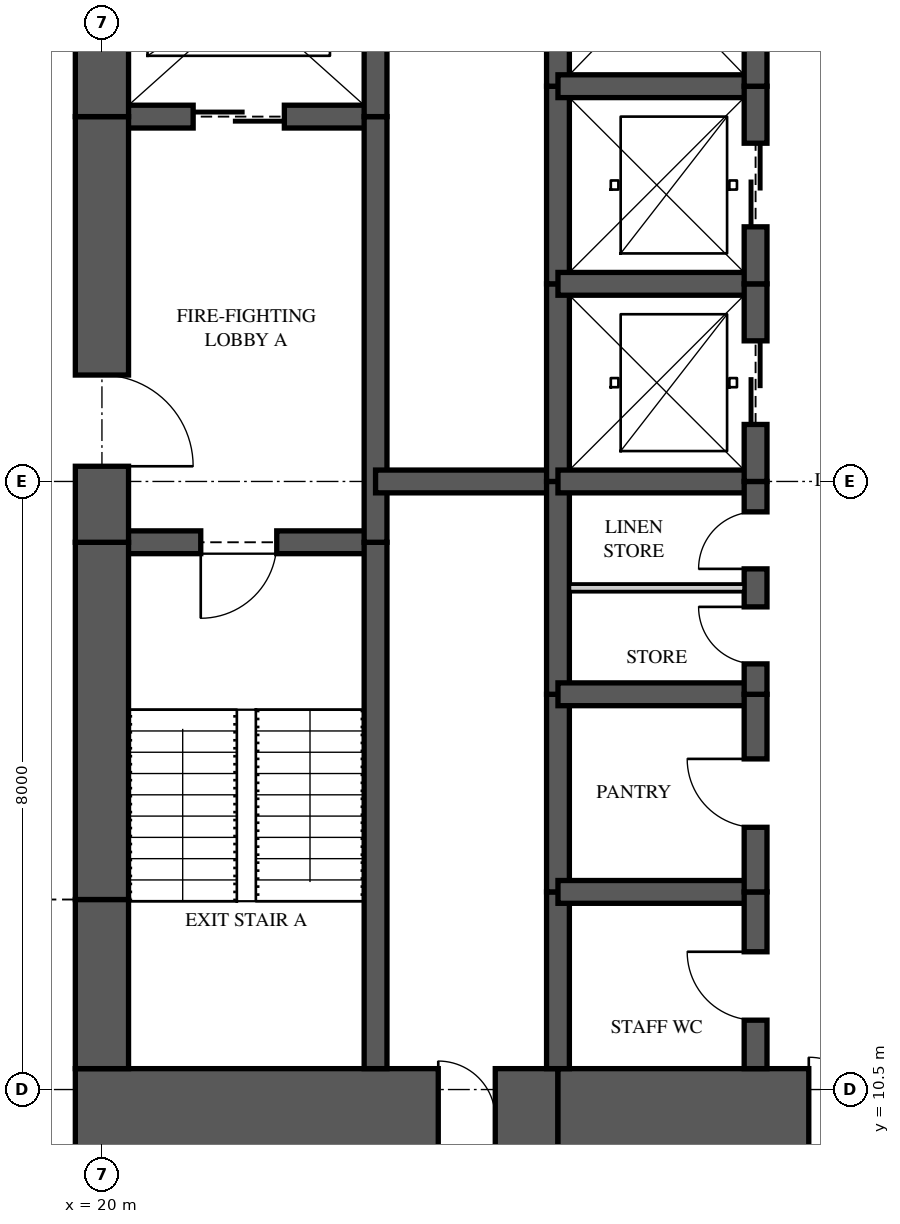
"""IFC4 building model, lengths in metres.
Left out: names, types, materials, properties, quantities, classifications, styles, units other than length and angle.
Written with IfcOpenShell. Run it as: python <this file> out.ifc"""

import sys

from ifc_helpers import new_model, si_unit, direction, frame, frame_2d, origin, place, context, subcontext, project, spatial, rectangle, extrude, element, fill, save


model = new_model("IFC4")
c1 = context("Model", 3, precision=1e-05, world=origin(), true_north=direction((0.0, 1.0)))
c2 = subcontext(c1, "Body", "Model", "MODEL_VIEW")
j1 = project(units=[si_unit("LENGTHUNIT", "METRE"), si_unit("PLANEANGLEUNIT", "RADIAN")], contexts=[c1])
p1 = place(None, origin())
s1 = spatial("IfcSite", under=j1, at=p1, CompositionType="ELEMENT")
p2 = place(p1, origin())
s2 = spatial("IfcBuilding", under=s1, at=p2, CompositionType="ELEMENT")
p3 = place(p2, frame((0.0, 0.0, 164.4)))
s3 = spatial("IfcBuildingStorey", under=s2, at=p3, CompositionType="ELEMENT", Elevation=164.4)
p4 = place(p3, frame((19.65, 10.125, 0.0), z_axis=(0.0, 0.0, 1.0), x_axis=(1.0, 0.0, 0.0)))
e1 = element("IfcWall", 1, at=p4, inside=s3, PredefinedType="SHEAR", context=c2, shape_type="SweptSolid", body=[
    extrude(rectangle(XDim=6.35, YDim=1.3, at=frame_2d((3.175, 0.0))), origin(), (0.0, 0.0, 1.0), 3.35),
])
p5 = place(p4, frame((4.775, 0.0, 0.0)))
e2 = element("IfcOpeningElement", 2, at=p5, cuts=e1, PredefinedType="OPENING", context=c2, shape_type="SweptSolid", body=[
    extrude(rectangle(XDim=0.75, YDim=2.1, at=frame_2d((0.375, 1.05))), frame((0.0, 0.66, 0.0), z_axis=(0.0, -1.0, 0.0), x_axis=(1.0, 0.0, 0.0)), (0.0, 0.0, 1.0), 1.32),
])
p6 = place(p3, frame((26.0, 10.125, 0.0), z_axis=(0.0, 0.0, 1.0), x_axis=(1.0, 0.0, 0.0)))
e3 = element("IfcWall", 3, at=p6, inside=s3, PredefinedType="SHEAR", context=c2, shape_type="SweptSolid", body=[
    extrude(rectangle(XDim=5.6, YDim=1.3, at=frame_2d((2.8, 0.0))), origin(), (0.0, 0.0, 1.0), 3.35),
])
p7 = place(p6, frame((3.3, 0.0, 0.0)))
e4 = element("IfcOpeningElement", 4, at=p7, cuts=e3, PredefinedType="OPENING", context=c2, shape_type="SweptSolid", body=[
    extrude(rectangle(XDim=1.6, YDim=2.1, at=frame_2d((0.8, 1.05))), frame((0.0, 0.66, 0.0), z_axis=(0.0, -1.0, 0.0), x_axis=(1.0, 0.0, 0.0)), (0.0, 0.0, 1.0), 1.32),
])
p8 = place(p3, frame((20.0, 26.225, 0.0), z_axis=(0.0, 0.0, 1.0), x_axis=(0.0, -1.0, 0.0)))
e5 = element("IfcWall", 5, at=p8, inside=s3, PredefinedType="SHEAR", context=c2, shape_type="SweptSolid", body=[
    extrude(rectangle(XDim=2.925, YDim=0.7, at=frame_2d((1.462, 0.0))), origin(), (0.0, 0.0, 1.0), 3.35),
])
p9 = place(p3, frame((20.0, 23.3, 0.0), z_axis=(0.0, 0.0, 1.0), x_axis=(0.0, -1.0, 0.0)))
e6 = element("IfcWall", 6, at=p9, inside=s3, PredefinedType="SHEAR", context=c2, shape_type="SweptSolid", body=[
    extrude(rectangle(XDim=5.6, YDim=0.7, at=frame_2d((2.8, 0.0))), origin(), (0.0, 0.0, 1.0), 3.35),
])
p10 = place(p9, frame((3.4, 0.0, 0.0)))
e7 = element("IfcOpeningElement", 7, at=p10, cuts=e6, PredefinedType="OPENING", context=c2, shape_type="SweptSolid", body=[
    extrude(rectangle(XDim=1.2, YDim=2.2, at=frame_2d((0.6, 1.1))), frame((0.0, 0.36, 0.0), z_axis=(0.0, -1.0, 0.0), x_axis=(1.0, 0.0, 0.0)), (0.0, 0.0, 1.0), 0.72),
])
p11 = place(p3, frame((20.0, 17.7, 0.0), z_axis=(0.0, 0.0, 1.0), x_axis=(0.0, -1.0, 0.0)))
e8 = element("IfcWall", 8, at=p11, inside=s3, PredefinedType="SHEAR", context=c2, shape_type="SweptSolid", body=[
    extrude(rectangle(XDim=4.7, YDim=0.7, at=frame_2d((2.35, 0.0))), origin(), (0.0, 0.0, 1.0), 3.35),
])
p12 = place(p3, frame((20.0, 13.0, 0.0), z_axis=(0.0, 0.0, 1.0), x_axis=(0.0, -1.0, 0.0)))
e9 = element("IfcWall", 9, at=p12, inside=s3, PredefinedType="SHEAR", context=c2, shape_type="SweptSolid", body=[
    extrude(rectangle(XDim=2.225, YDim=0.7, at=frame_2d((1.113, 0.0))), origin(), (0.0, 0.0, 1.0), 3.35),
])
p13 = place(p3, frame((23.6, 10.775, 0.0), z_axis=(0.0, 0.0, 1.0), x_axis=(0.0, 1.0, 0.0)))
e10 = element("IfcWall", 10, at=p13, inside=s3, PredefinedType="SHEAR", context=c2, shape_type="SweptSolid", body=[
    extrude(rectangle(XDim=6.925, YDim=0.3, at=frame_2d((3.462, 0.0))), origin(), (0.0, 0.0, 1.0), 3.35),
])
p14 = place(p3, frame((23.6, 17.7, 0.0), z_axis=(0.0, 0.0, 1.0), x_axis=(0.0, 1.0, 0.0)))
e11 = element("IfcWall", 11, at=p14, inside=s3, PredefinedType="SHEAR", context=c2, shape_type="SweptSolid", body=[
    extrude(rectangle(XDim=5.6, YDim=0.3, at=frame_2d((2.8, 0.0))), origin(), (0.0, 0.0, 1.0), 3.35),
])
p15 = place(p3, frame((23.6, 23.3, 0.0), z_axis=(0.0, 0.0, 1.0), x_axis=(0.0, 1.0, 0.0)))
e12 = element("IfcWall", 12, at=p15, inside=s3, PredefinedType="SHEAR", context=c2, shape_type="SweptSolid", body=[
    extrude(rectangle(XDim=2.925, YDim=0.3, at=frame_2d((1.462, 0.0))), origin(), (0.0, 0.0, 1.0), 3.35),
])
p16 = place(p3, frame((26.0, 10.775, 0.0), z_axis=(0.0, 0.0, 1.0), x_axis=(0.0, 1.0, 0.0)))
e13 = element("IfcWall", 13, at=p16, inside=s3, PredefinedType="SHEAR", context=c2, shape_type="SweptSolid", body=[
    extrude(rectangle(XDim=2.325, YDim=0.3, at=frame_2d((1.163, 0.0))), origin(), (0.0, 0.0, 1.0), 3.35),
])
p17 = place(p3, frame((26.0, 13.1, 0.0), z_axis=(0.0, 0.0, 1.0), x_axis=(0.0, 1.0, 0.0)))
e14 = element("IfcWall", 14, at=p17, inside=s3, PredefinedType="SHEAR", context=c2, shape_type="SweptSolid", body=[
    extrude(rectangle(XDim=2.6, YDim=0.3, at=frame_2d((1.3, 0.0))), origin(), (0.0, 0.0, 1.0), 3.35),
])
p18 = place(p3, frame((26.0, 15.7, 0.0), z_axis=(0.0, 0.0, 1.0), x_axis=(0.0, 1.0, 0.0)))
e15 = element("IfcWall", 15, at=p18, inside=s3, PredefinedType="SHEAR", context=c2, shape_type="SweptSolid", body=[
    extrude(rectangle(XDim=2.8, YDim=0.3, at=frame_2d((1.4, 0.0))), origin(), (0.0, 0.0, 1.0), 3.35),
])
p19 = place(p3, frame((26.0, 18.5, 0.0), z_axis=(0.0, 0.0, 1.0), x_axis=(0.0, 1.0, 0.0)))
e16 = element("IfcWall", 16, at=p19, inside=s3, PredefinedType="SHEAR", context=c2, shape_type="SweptSolid", body=[
    extrude(rectangle(XDim=2.6, YDim=0.3, at=frame_2d((1.3, 0.0))), origin(), (0.0, 0.0, 1.0), 3.35),
])
p20 = place(p3, frame((26.0, 21.1, 0.0), z_axis=(0.0, 0.0, 1.0), x_axis=(0.0, 1.0, 0.0)))
e17 = element("IfcWall", 17, at=p20, inside=s3, PredefinedType="SHEAR", context=c2, shape_type="SweptSolid", body=[
    extrude(rectangle(XDim=2.6, YDim=0.3, at=frame_2d((1.3, 0.0))), origin(), (0.0, 0.0, 1.0), 3.35),
])
p21 = place(p3, frame((26.0, 23.7, 0.0), z_axis=(0.0, 0.0, 1.0), x_axis=(0.0, 1.0, 0.0)))
e18 = element("IfcWall", 18, at=p21, inside=s3, PredefinedType="SHEAR", context=c2, shape_type="SweptSolid", body=[
    extrude(rectangle(XDim=2.525, YDim=0.3, at=frame_2d((1.263, 0.0))), origin(), (0.0, 0.0, 1.0), 3.35),
])
p22 = place(p3, frame((28.6, 10.775, 0.0), z_axis=(0.0, 0.0, 1.0), x_axis=(0.0, 1.0, 0.0)))
e19 = element("IfcWall", 19, at=p22, inside=s3, PredefinedType="SHEAR", context=c2, shape_type="SweptSolid", body=[
    extrude(rectangle(XDim=2.325, YDim=0.3, at=frame_2d((1.163, 0.0))), origin(), (0.0, 0.0, 1.0), 3.35),
])
p23 = place(p22, frame((0.637, 0.0, 0.0)))
e20 = element("IfcOpeningElement", 20, at=p23, cuts=e19, PredefinedType="OPENING", context=c2, shape_type="SweptSolid", body=[
    extrude(rectangle(XDim=0.9, YDim=2.1, at=frame_2d((0.45, 1.05))), frame((0.0, 0.16, 0.0), z_axis=(0.0, -1.0, 0.0), x_axis=(1.0, 0.0, 0.0)), (0.0, 0.0, 1.0), 0.32),
])
p24 = place(p3, frame((28.6, 13.1, 0.0), z_axis=(0.0, 0.0, 1.0), x_axis=(0.0, 1.0, 0.0)))
e21 = element("IfcWall", 21, at=p24, inside=s3, PredefinedType="SHEAR", context=c2, shape_type="SweptSolid", body=[
    extrude(rectangle(XDim=2.6, YDim=0.3, at=frame_2d((1.3, 0.0))), origin(), (0.0, 0.0, 1.0), 3.35),
])
p25 = place(p24, frame((0.85, 0.0, 0.0)))
e22 = element("IfcOpeningElement", 22, at=p25, cuts=e21, PredefinedType="OPENING", context=c2, shape_type="SweptSolid", body=[
    extrude(rectangle(XDim=0.9, YDim=2.1, at=frame_2d((0.45, 1.05))), frame((0.0, 0.16, 0.0), z_axis=(0.0, -1.0, 0.0), x_axis=(1.0, 0.0, 0.0)), (0.0, 0.0, 1.0), 0.32),
])
p26 = place(p3, frame((28.6, 15.7, 0.0), z_axis=(0.0, 0.0, 1.0), x_axis=(0.0, 1.0, 0.0)))
e23 = element("IfcWall", 23, at=p26, inside=s3, PredefinedType="SHEAR", context=c2, shape_type="SweptSolid", body=[
    extrude(rectangle(XDim=2.8, YDim=0.3, at=frame_2d((1.4, 0.0))), origin(), (0.0, 0.0, 1.0), 3.35),
])
p27 = place(p26, frame((0.4, 0.0, 0.0)))
e24 = element("IfcOpeningElement", 24, at=p27, cuts=e23, PredefinedType="OPENING", context=c2, shape_type="SweptSolid", body=[
    extrude(rectangle(XDim=0.75, YDim=2.1, at=frame_2d((0.375, 1.05))), frame((0.0, 0.16, 0.0), z_axis=(0.0, -1.0, 0.0), x_axis=(1.0, 0.0, 0.0)), (0.0, 0.0, 1.0), 0.32),
])
p28 = place(p26, frame((1.65, 0.0, 0.0)))
e25 = element("IfcOpeningElement", 25, at=p28, cuts=e23, PredefinedType="OPENING", context=c2, shape_type="SweptSolid", body=[
    extrude(rectangle(XDim=0.75, YDim=2.1, at=frame_2d((0.375, 1.05))), frame((0.0, 0.16, 0.0), z_axis=(0.0, -1.0, 0.0), x_axis=(1.0, 0.0, 0.0)), (0.0, 0.0, 1.0), 0.32),
])
p29 = place(p3, frame((28.6, 18.5, 0.0), z_axis=(0.0, 0.0, 1.0), x_axis=(0.0, 1.0, 0.0)))
e26 = element("IfcWall", 26, at=p29, inside=s3, PredefinedType="SHEAR", context=c2, shape_type="SweptSolid", body=[
    extrude(rectangle(XDim=2.6, YDim=0.3, at=frame_2d((1.3, 0.0))), origin(), (0.0, 0.0, 1.0), 3.35),
])
p30 = place(p29, frame((0.75, 0.0, 0.0)))
e27 = element("IfcOpeningElement", 27, at=p30, cuts=e26, PredefinedType="OPENING", context=c2, shape_type="SweptSolid", body=[
    extrude(rectangle(XDim=1.1, YDim=2.1, at=frame_2d((0.55, 1.05))), frame((0.0, 0.16, 0.0), z_axis=(0.0, -1.0, 0.0), x_axis=(1.0, 0.0, 0.0)), (0.0, 0.0, 1.0), 0.32),
])
p31 = place(p3, frame((28.6, 21.1, 0.0), z_axis=(0.0, 0.0, 1.0), x_axis=(0.0, 1.0, 0.0)))
e28 = element("IfcWall", 28, at=p31, inside=s3, PredefinedType="SHEAR", context=c2, shape_type="SweptSolid", body=[
    extrude(rectangle(XDim=2.6, YDim=0.3, at=frame_2d((1.3, 0.0))), origin(), (0.0, 0.0, 1.0), 3.35),
])
p32 = place(p31, frame((0.75, 0.0, 0.0)))
e29 = element("IfcOpeningElement", 29, at=p32, cuts=e28, PredefinedType="OPENING", context=c2, shape_type="SweptSolid", body=[
    extrude(rectangle(XDim=1.1, YDim=2.1, at=frame_2d((0.55, 1.05))), frame((0.0, 0.16, 0.0), z_axis=(0.0, -1.0, 0.0), x_axis=(1.0, 0.0, 0.0)), (0.0, 0.0, 1.0), 0.32),
])
p33 = place(p3, frame((28.6, 23.7, 0.0), z_axis=(0.0, 0.0, 1.0), x_axis=(0.0, 1.0, 0.0)))
e30 = element("IfcWall", 30, at=p33, inside=s3, PredefinedType="SHEAR", context=c2, shape_type="SweptSolid", body=[
    extrude(rectangle(XDim=2.525, YDim=0.3, at=frame_2d((1.263, 0.0))), origin(), (0.0, 0.0, 1.0), 3.35),
])
p34 = place(p33, frame((0.85, 0.0, 0.0)))
e31 = element("IfcOpeningElement", 31, at=p34, cuts=e30, PredefinedType="OPENING", context=c2, shape_type="SweptSolid", body=[
    extrude(rectangle(XDim=1.1, YDim=2.1, at=frame_2d((0.55, 1.05))), frame((0.0, 0.16, 0.0), z_axis=(0.0, -1.0, 0.0), x_axis=(1.0, 0.0, 0.0)), (0.0, 0.0, 1.0), 0.32),
])
p35 = place(p3, frame((20.0, 17.7, 0.0), z_axis=(0.0, 0.0, 1.0), x_axis=(1.0, 0.0, 0.0)))
e32 = element("IfcWall", 32, at=p35, inside=s3, PredefinedType="SHEAR", context=c2, shape_type="SweptSolid", body=[
    extrude(rectangle(XDim=3.6, YDim=0.3, at=frame_2d((1.8, 0.0))), origin(), (0.0, 0.0, 1.0), 3.35),
])
p36 = place(p35, frame((1.3, 0.0, 0.0)))
e33 = element("IfcOpeningElement", 33, at=p36, cuts=e32, PredefinedType="OPENING", context=c2, shape_type="SweptSolid", body=[
    extrude(rectangle(XDim=1.0, YDim=2.1, at=frame_2d((0.5, 1.05))), frame((0.0, 0.16, 0.0), z_axis=(0.0, -1.0, 0.0), x_axis=(1.0, 0.0, 0.0)), (0.0, 0.0, 1.0), 0.32),
])
p37 = place(p3, frame((20.0, 23.3, 0.0), z_axis=(0.0, 0.0, 1.0), x_axis=(1.0, 0.0, 0.0)))
e34 = element("IfcWall", 34, at=p37, inside=s3, PredefinedType="SHEAR", context=c2, shape_type="SweptSolid", body=[
    extrude(rectangle(XDim=3.6, YDim=0.3, at=frame_2d((1.8, 0.0))), origin(), (0.0, 0.0, 1.0), 3.35),
])
p38 = place(p37, frame((1.2, 0.0, 0.0)))
e35 = element("IfcOpeningElement", 35, at=p38, cuts=e34, PredefinedType="OPENING", context=c2, shape_type="SweptSolid", body=[
    extrude(rectangle(XDim=1.2, YDim=2.1, at=frame_2d((0.6, 1.05))), frame((0.0, 0.16, 0.0), z_axis=(0.0, -1.0, 0.0), x_axis=(1.0, 0.0, 0.0)), (0.0, 0.0, 1.0), 0.32),
])
p39 = place(p3, frame((23.6, 18.5, 0.0), z_axis=(0.0, 0.0, 1.0), x_axis=(1.0, 0.0, 0.0)))
e36 = element("IfcWall", 36, at=p39, inside=s3, PredefinedType="SHEAR", context=c2, shape_type="SweptSolid", body=[
    extrude(rectangle(XDim=2.4, YDim=0.3, at=frame_2d((1.2, 0.0))), origin(), (0.0, 0.0, 1.0), 3.35),
])
for number, where, z_axis, x_axis in (
    (37, (26.0, 13.1, 0.0), (0.0, 0.0, 1.0), (1.0, 0.0, 0.0)),
    (38, (26.0, 15.7, 0.0), (0.0, 0.0, 1.0), (1.0, 0.0, 0.0)),
    (39, (26.0, 18.5, 0.0), (0.0, 0.0, 1.0), (1.0, 0.0, 0.0)),
    (40, (26.0, 21.1, 0.0), (0.0, 0.0, 1.0), (1.0, 0.0, 0.0)),
    (41, (26.0, 23.7, 0.0), (0.0, 0.0, 1.0), (1.0, 0.0, 0.0)),
):
    element("IfcWall", number, at=place(p3, frame(where, z_axis=z_axis, x_axis=x_axis)), inside=s3, PredefinedType="SHEAR", context=c2, shape_type="SweptSolid", body=[
        extrude(rectangle(XDim=2.6, YDim=0.3, at=frame_2d((1.3, 0.0))), origin(), (0.0, 0.0, 1.0), 3.35),
    ])
p40 = place(p3, frame((26.15, 17.1, 0.0), z_axis=(0.0, 0.0, 1.0), x_axis=(1.0, 0.0, 0.0)))
e42 = element("IfcWall", 42, at=p40, inside=s3, PredefinedType="PARTITIONING", context=c2, shape_type="SweptSolid", body=[
    extrude(rectangle(XDim=2.3, YDim=0.1, at=frame_2d((1.15, 0.0))), origin(), (0.0, 0.0, 1.0), 3.11),
])
p41 = place(p36, frame((1.0, 0.0, 0.0), z_axis=(0.0, 0.0, 1.0), x_axis=(-1.0, 0.0, 0.0)))
e43 = element("IfcDoor", 43, at=p41, inside=s3, OperationType="SINGLE_SWING_RIGHT", PredefinedType="DOOR", context=c2, shape_type="SweptSolid", body=[
    extrude(rectangle(XDim=1.0, YDim=2.1, at=frame_2d((0.5, 1.05))), frame((0.0, 0.025, 0.0), z_axis=(0.0, -1.0, 0.0), x_axis=(1.0, 0.0, 0.0)), (0.0, 0.0, 1.0), 0.05),
])
fill(e33, e43)
p42 = place(p10, origin())
e44 = element("IfcDoor", 44, at=p42, inside=s3, OperationType="SINGLE_SWING_RIGHT", PredefinedType="DOOR", context=c2, shape_type="SweptSolid", body=[
    extrude(rectangle(XDim=1.2, YDim=2.2, at=frame_2d((0.6, 1.1))), frame((0.0, 0.025, 0.0), z_axis=(0.0, -1.0, 0.0), x_axis=(1.0, 0.0, 0.0)), (0.0, 0.0, 1.0), 0.05),
])
fill(e7, e44)
p43 = place(p38, origin())
e45 = element("IfcDoor", 45, at=p43, inside=s3, OperationType="SLIDING_TO_LEFT", PredefinedType="DOOR", context=c2, shape_type="SweptSolid", body=[
    extrude(rectangle(XDim=1.2, YDim=2.1, at=frame_2d((0.6, 1.05))), frame((0.0, 0.025, 0.0), z_axis=(0.0, -1.0, 0.0), x_axis=(1.0, 0.0, 0.0)), (0.0, 0.0, 1.0), 0.05),
])
fill(e35, e45)
p44 = place(p30, origin())
e46 = element("IfcDoor", 46, at=p44, inside=s3, OperationType="SLIDING_TO_LEFT", PredefinedType="DOOR", context=c2, shape_type="SweptSolid", body=[
    extrude(rectangle(XDim=1.1, YDim=2.1, at=frame_2d((0.55, 1.05))), frame((0.0, 0.025, 0.0), z_axis=(0.0, -1.0, 0.0), x_axis=(1.0, 0.0, 0.0)), (0.0, 0.0, 1.0), 0.05),
])
fill(e27, e46)
p45 = place(p32, origin())
e47 = element("IfcDoor", 47, at=p45, inside=s3, OperationType="SLIDING_TO_LEFT", PredefinedType="DOOR", context=c2, shape_type="SweptSolid", body=[
    extrude(rectangle(XDim=1.1, YDim=2.1, at=frame_2d((0.55, 1.05))), frame((0.0, 0.025, 0.0), z_axis=(0.0, -1.0, 0.0), x_axis=(1.0, 0.0, 0.0)), (0.0, 0.0, 1.0), 0.05),
])
fill(e29, e47)
p46 = place(p23, origin())
e48 = element("IfcDoor", 48, at=p46, inside=s3, OperationType="SINGLE_SWING_RIGHT", PredefinedType="DOOR", context=c2, shape_type="SweptSolid", body=[
    extrude(rectangle(XDim=0.9, YDim=2.1, at=frame_2d((0.45, 1.05))), frame((0.0, 0.025, 0.0), z_axis=(0.0, -1.0, 0.0), x_axis=(1.0, 0.0, 0.0)), (0.0, 0.0, 1.0), 0.05),
])
fill(e20, e48)
p47 = place(p25, origin())
e49 = element("IfcDoor", 49, at=p47, inside=s3, OperationType="SINGLE_SWING_RIGHT", PredefinedType="DOOR", context=c2, shape_type="SweptSolid", body=[
    extrude(rectangle(XDim=0.9, YDim=2.1, at=frame_2d((0.45, 1.05))), frame((0.0, 0.025, 0.0), z_axis=(0.0, -1.0, 0.0), x_axis=(1.0, 0.0, 0.0)), (0.0, 0.0, 1.0), 0.05),
])
fill(e22, e49)
p48 = place(p27, origin())
e50 = element("IfcDoor", 50, at=p48, inside=s3, OperationType="SINGLE_SWING_RIGHT", PredefinedType="DOOR", context=c2, shape_type="SweptSolid", body=[
    extrude(rectangle(XDim=0.75, YDim=2.1, at=frame_2d((0.375, 1.05))), frame((0.0, 0.025, 0.0), z_axis=(0.0, -1.0, 0.0), x_axis=(1.0, 0.0, 0.0)), (0.0, 0.0, 1.0), 0.05),
])
fill(e24, e50)
p49 = place(p28, origin())
e51 = element("IfcDoor", 51, at=p49, inside=s3, OperationType="SINGLE_SWING_LEFT", PredefinedType="DOOR", context=c2, shape_type="SweptSolid", body=[
    extrude(rectangle(XDim=0.75, YDim=2.1, at=frame_2d((0.375, 1.05))), frame((0.0, 0.025, 0.0), z_axis=(0.0, -1.0, 0.0), x_axis=(1.0, 0.0, 0.0)), (0.0, 0.0, 1.0), 0.05),
])
fill(e25, e51)
p50 = place(p7, origin())
e52 = element("IfcDoor", 52, at=p50, inside=s3, OperationType="DOUBLE_DOOR_SINGLE_SWING", PredefinedType="DOOR", context=c2, shape_type="SweptSolid", body=[
    extrude(rectangle(XDim=1.6, YDim=2.1, at=frame_2d((0.8, 1.05))), frame((0.0, 0.025, 0.0), z_axis=(0.0, -1.0, 0.0), x_axis=(1.0, 0.0, 0.0)), (0.0, 0.0, 1.0), 0.05),
])
fill(e4, e52)
p51 = place(p5, origin())
e53 = element("IfcDoor", 53, at=p51, inside=s3, OperationType="SINGLE_SWING_LEFT", PredefinedType="DOOR", context=c2, shape_type="SweptSolid", body=[
    extrude(rectangle(XDim=0.75, YDim=2.1, at=frame_2d((0.375, 1.05))), frame((0.0, 0.025, 0.0), z_axis=(0.0, -1.0, 0.0), x_axis=(1.0, 0.0, 0.0)), (0.0, 0.0, 1.0), 0.05),
])
fill(e2, e53)
save(model, sys.argv[1])
